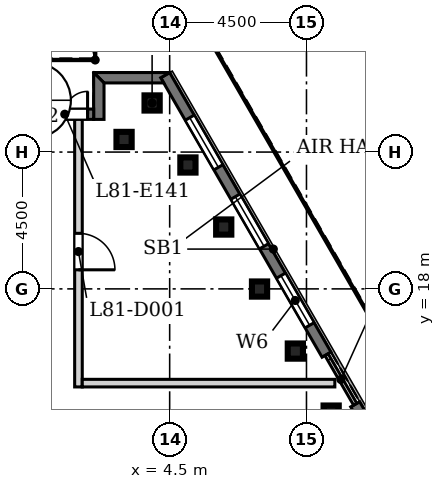
"""IFC4 building model, lengths in metres.
Left out: names, types, materials, properties, quantities, classifications, styles, units other than length and angle.
Written with IfcOpenShell. Run it as: python <this file> out.ifc"""

import sys

from ifc_helpers import new_model, si_unit, direction, frame, frame_2d, origin, origin_2d, place, context, subcontext, project, spatial, polyline, rectangle, hollow_rectangle, outline, extrude, element, fill, save


model = new_model("IFC4")
c1 = context("Model", 3, precision=1e-05, world=origin(), true_north=direction((0.0, 1.0)))
c2 = subcontext(c1, "Body", "Model", "MODEL_VIEW")
j1 = project(units=[si_unit("LENGTHUNIT", "METRE"), si_unit("PLANEANGLEUNIT", "RADIAN")], contexts=[c1])
p1 = place(None, origin())
s1 = spatial("IfcSite", under=j1, at=p1, CompositionType="ELEMENT")
p2 = place(p1, origin())
s2 = spatial("IfcBuilding", under=s1, at=p2, CompositionType="ELEMENT")
p3 = place(p2, frame((0.0, 0.0, 359.6)))
s3 = spatial("IfcBuildingStorey", under=s2, at=p3, CompositionType="ELEMENT", Elevation=359.6)
for number, where, z_axis, x_axis in (
    (1, (9.812, 13.914, 0.0), (0.0, 0.0, 1.0), (1.0, 0.0, 0.0)),
    (2, (8.634, 15.955, 0.0), (0.0, 0.0, 1.0), (1.0, 0.0, 0.0)),
    (3, (7.456, 17.994, 0.0), (0.0, 0.0, 1.0), (1.0, 0.0, 0.0)),
    (4, (6.278, 20.035, 0.0), (0.0, 0.0, 1.0), (1.0, 0.0, 0.0)),
    (5, (5.101, 22.075, 0.0), (0.0, 0.0, 1.0), (1.0, 0.0, 0.0)),
    (6, (3.923, 24.115, 0.0), (0.0, 0.0, 1.0), (1.0, 0.0, 0.0)),
    (7, (3.0, 22.915, 0.0), (0.0, 0.0, 1.0), (1.0, 0.0, 0.0)),
):
    element("IfcColumn", number, at=place(p3, frame(where, z_axis=z_axis, x_axis=x_axis)), inside=s3, PredefinedType="COLUMN", context=c2, shape_type="SweptSolid", body=[
        extrude(hollow_rectangle(XDim=0.5, YDim=0.5, WallThickness=0.025, at=origin_2d()), origin(), (0.0, 0.0, 1.0), 3.6),
    ])
p4 = place(p3, frame((12.66, 10.641, 0.0), z_axis=(0.0, 0.0, 1.0), x_axis=(-0.500018604663, 0.866014662111, 0.0)))
e8 = element("IfcWall", 8, at=p4, inside=s3, PredefinedType="SOLIDWALL", context=c2, shape_type="SweptSolid", body=[
    extrude(rectangle(XDim=4.115, YDim=0.34, at=frame_2d((2.058, 0.0))), origin(), (0.0, 0.0, 1.0), 3.6),
])
p5 = place(p4, frame((1.115, 0.0, 0.0)))
e9 = element("IfcOpeningElement", 9, at=p5, cuts=e8, PredefinedType="OPENING", context=c2, shape_type="SweptSolid", body=[
    extrude(rectangle(XDim=1.885, YDim=2.6, at=frame_2d((0.942, 1.3))), frame((0.0, 0.18, 0.0), z_axis=(0.0, -1.0, 0.0), x_axis=(1.0, 0.0, 0.0)), (0.0, 0.0, 1.0), 0.36),
])
p6 = place(p3, frame((9.66, 15.837, 0.0), z_axis=(0.0, 0.0, 1.0), x_axis=(-0.500007813417, 0.866020892659, 0.0)))
e10 = element("IfcWall", 10, at=p6, inside=s3, PredefinedType="SOLIDWALL", context=c2, shape_type="SweptSolid", body=[
    extrude(rectangle(XDim=10.615, YDim=0.34, at=frame_2d((5.308, 0.0))), origin(), (0.0, 0.0, 1.0), 3.6),
])
p7 = place(p6, frame((1.115, 0.0, 0.9)))
e11 = element("IfcOpeningElement", 11, at=p7, cuts=e10, PredefinedType="OPENING", context=c2, shape_type="SweptSolid", body=[
    extrude(rectangle(XDim=1.885, YDim=3.0, at=frame_2d((0.942, 1.5))), frame((0.0, 0.18, 0.0), z_axis=(0.0, -1.0, 0.0), x_axis=(1.0, 0.0, 0.0)), (0.0, 0.0, 1.0), 0.36),
])
p8 = place(p6, frame((4.115, 0.0, 0.9)))
e12 = element("IfcOpeningElement", 12, at=p8, cuts=e10, PredefinedType="OPENING", context=c2, shape_type="SweptSolid", body=[
    extrude(rectangle(XDim=1.885, YDim=3.0, at=frame_2d((0.942, 1.5))), frame((0.0, 0.18, 0.0), z_axis=(0.0, -1.0, 0.0), x_axis=(1.0, 0.0, 0.0)), (0.0, 0.0, 1.0), 0.36),
])
p9 = place(p6, frame((7.115, 0.0, 0.9)))
e13 = element("IfcOpeningElement", 13, at=p9, cuts=e10, PredefinedType="OPENING", context=c2, shape_type="SweptSolid", body=[
    extrude(rectangle(XDim=1.885, YDim=3.0, at=frame_2d((0.942, 1.5))), frame((0.0, 0.18, 0.0), z_axis=(0.0, -1.0, 0.0), x_axis=(1.0, 0.0, 0.0)), (0.0, 0.0, 1.0), 0.36),
])
p10 = place(p3, origin())
e14 = element("IfcWall", 14, at=p10, inside=s3, PredefinedType="SOLIDWALL", context=c2, shape_type="SweptSolid", body=[
    extrude(outline(polyline([(1.999, 25.115), (4.501, 25.115), (4.501, 25.115), (4.206, 24.945), (4.305, 24.774), (2.34, 24.774), (1.999, 25.115), (1.999, 25.115)])), origin(), (0.0, 0.0, 1.0), 3.6),
])
p11 = place(p3, origin())
e15 = element("IfcWall", 15, at=p11, inside=s3, PredefinedType="SOLIDWALL", context=c2, shape_type="SweptSolid", body=[
    extrude(outline(polyline([(2.341, 23.574), (2.0, 23.574), (2.0, 25.116), (2.0, 25.116), (2.341, 24.775), (2.341, 23.574)])), origin(), (0.0, 0.0, 1.0), 3.6),
])
p12 = place(p3, frame((2.0, 23.745, 0.0), z_axis=(0.0, 0.0, 1.0), x_axis=(-1.0, 0.0, 0.0)))
e16 = element("IfcWall", 16, at=p12, inside=s3, PredefinedType="SOLIDWALL", context=c2, shape_type="SweptSolid", body=[
    extrude(rectangle(XDim=4.0, YDim=0.34, at=frame_2d((2.0, 0.0))), origin(), (0.0, 0.0, 1.0), 3.6),
])
p13 = place(p12, frame((0.2, 0.0, 0.0)))
e17 = element("IfcOpeningElement", 17, at=p13, cuts=e16, PredefinedType="OPENING", context=c2, shape_type="SweptSolid", body=[
    extrude(rectangle(XDim=1.5, YDim=2.4, at=frame_2d((0.75, 1.2))), frame((0.0, 0.18, 0.0), z_axis=(0.0, -1.0, 0.0), x_axis=(1.0, 0.0, 0.0)), (0.0, 0.0, 1.0), 0.36),
])
p14 = place(p3, frame((1.5, 23.575, 0.0), z_axis=(0.0, 0.0, 1.0), x_axis=(0.0, -1.0, 0.0)))
e18 = element("IfcWall", 18, at=p14, inside=s3, PredefinedType="SOLIDWALL", context=c2, shape_type="SweptSolid", body=[
    extrude(rectangle(XDim=8.8, YDim=0.25, at=frame_2d((4.4, 0.0))), origin(), (0.0, 0.0, 1.0), 3.6),
])
p15 = place(p14, frame((3.747, 0.0, 0.0)))
e19 = element("IfcOpeningElement", 19, at=p15, cuts=e18, PredefinedType="OPENING", context=c2, shape_type="SweptSolid", body=[
    extrude(rectangle(XDim=1.2, YDim=2.1, at=frame_2d((0.6, 1.05))), frame((0.0, 0.135, 0.0), z_axis=(0.0, -1.0, 0.0), x_axis=(1.0, 0.0, 0.0)), (0.0, 0.0, 1.0), 0.27),
])
p16 = place(p3, frame((1.625, 14.9, 0.0), z_axis=(0.0, 0.0, 1.0), x_axis=(1.0, 0.0, 0.0)))
e20 = element("IfcWall", 20, at=p16, inside=s3, PredefinedType="SOLIDWALL", context=c2, shape_type="SweptSolid", body=[
    extrude(rectangle(XDim=8.308, YDim=0.25, at=frame_2d((4.154, 0.0))), origin(), (0.0, 0.0, 1.0), 3.6),
])
p17 = place(p7, origin())
e21 = element("IfcWindow", 21, at=p17, inside=s3, PartitioningType="SINGLE_PANEL", PredefinedType="WINDOW", context=c2, shape_type="SweptSolid", body=[
    extrude(rectangle(XDim=1.885, YDim=3.0, at=frame_2d((0.942, 1.5))), frame((0.0, 0.11, 0.0), z_axis=(0.0, -1.0, 0.0), x_axis=(1.0, 0.0, 0.0)), (0.0, 0.0, 1.0), 0.06),
])
fill(e11, e21)
p18 = place(p8, origin())
e22 = element("IfcWindow", 22, at=p18, inside=s3, PartitioningType="SINGLE_PANEL", PredefinedType="WINDOW", context=c2, shape_type="SweptSolid", body=[
    extrude(rectangle(XDim=1.885, YDim=3.0, at=frame_2d((0.942, 1.5))), frame((0.0, 0.11, 0.0), z_axis=(0.0, -1.0, 0.0), x_axis=(1.0, 0.0, 0.0)), (0.0, 0.0, 1.0), 0.06),
])
fill(e12, e22)
p19 = place(p9, origin())
e23 = element("IfcWindow", 23, at=p19, inside=s3, PartitioningType="SINGLE_PANEL", PredefinedType="WINDOW", context=c2, shape_type="SweptSolid", body=[
    extrude(rectangle(XDim=1.885, YDim=3.0, at=frame_2d((0.942, 1.5))), frame((0.0, 0.11, 0.0), z_axis=(0.0, -1.0, 0.0), x_axis=(1.0, 0.0, 0.0)), (0.0, 0.0, 1.0), 0.06),
])
fill(e13, e23)
p20 = place(p13, frame((1.5, 0.0, 0.0), z_axis=(0.0, 0.0, 1.0), x_axis=(-1.0, 0.0, 0.0)))
e24 = element("IfcDoor", 24, at=p20, inside=s3, OperationType="DOUBLE_DOOR_SINGLE_SWING", PredefinedType="DOOR", context=c2, shape_type="SweptSolid", body=[
    extrude(rectangle(XDim=1.5, YDim=2.4, at=frame_2d((0.75, 1.2))), frame((0.0, 0.025, 0.0), z_axis=(0.0, -1.0, 0.0), x_axis=(1.0, 0.0, 0.0)), (0.0, 0.0, 1.0), 0.05),
])
fill(e17, e24)
p21 = place(p15, origin())
e25 = element("IfcDoor", 25, at=p21, inside=s3, OperationType="SINGLE_SWING_RIGHT", PredefinedType="DOOR", context=c2, shape_type="SweptSolid", body=[
    extrude(rectangle(XDim=1.2, YDim=2.1, at=frame_2d((0.6, 1.05))), frame((0.0, 0.025, 0.0), z_axis=(0.0, -1.0, 0.0), x_axis=(1.0, 0.0, 0.0)), (0.0, 0.0, 1.0), 0.05),
])
fill(e19, e25)
save(model, sys.argv[1])
